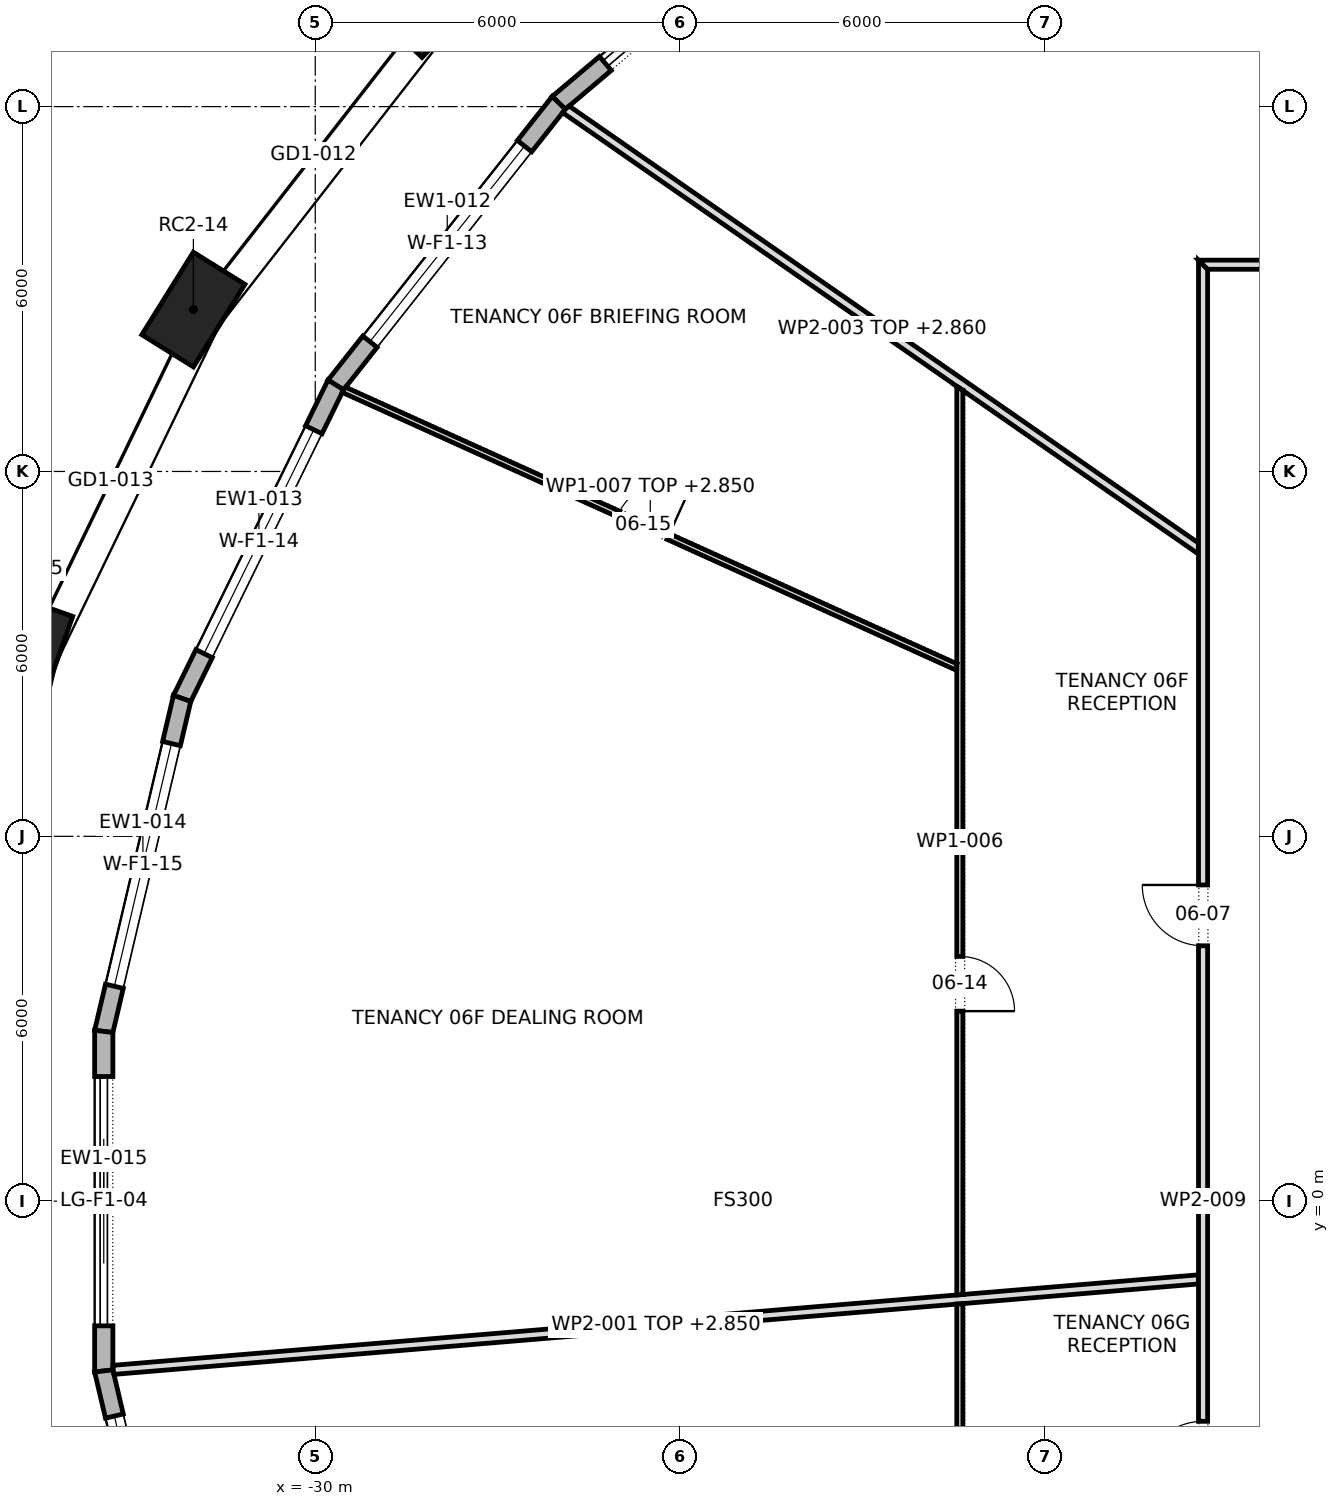
"""IFC4 building model, lengths in metres.
Left out: names, types, materials, properties, quantities, classifications, styles, units other than length and angle.
Written with IfcOpenShell. Run it as: python <this file> out.ifc"""

import sys

from ifc_helpers import new_model, si_unit, direction, frame, frame_2d, origin, origin_2d, place, context, subcontext, project, spatial, polyline, rectangle, outline, extrude, element, fill, save


model = new_model("IFC4")
c1 = context("Model", 3, precision=1e-05, world=origin(), true_north=direction((0.0, 1.0)))
c2 = subcontext(c1, "Body", "Model", "MODEL_VIEW")
j1 = project(units=[si_unit("LENGTHUNIT", "METRE"), si_unit("PLANEANGLEUNIT", "RADIAN")], contexts=[c1])
p1 = place(None, origin())
s1 = spatial("IfcSite", under=j1, at=p1, CompositionType="ELEMENT")
p2 = place(p1, origin())
s2 = spatial("IfcBuilding", under=s1, at=p2, CompositionType="ELEMENT")
p3 = place(p2, frame((0.0, 0.0, 86.5)))
s3 = spatial("IfcBuildingStorey", under=s2, at=p3, CompositionType="ELEMENT", Elevation=86.5)
for number, where, z_axis, x_axis in (
    (1, (-28.052, 19.733, 0.0), (0.0, 0.0, 1.0), (-0.692, -0.722, 0.0)),
    (2, (-32.004, 14.663, 0.0), (0.0, 0.0, 1.0), (-0.529, -0.849, 0.0)),
    (3, (-34.727, 9.029, 0.0), (0.0, 0.0, 1.0), (-0.334, -0.943, 0.0)),
):
    element("IfcColumn", number, at=place(p3, frame(where, z_axis=z_axis, x_axis=x_axis)), inside=s3, PredefinedType="COLUMN", context=c2, shape_type="SweptSolid", body=[
        extrude(rectangle(XDim=1.6, YDim=1.0, at=origin_2d()), origin(), (0.0, 0.0, 1.0), 4.2),
    ])
p4 = place(p3, frame((-21.332, 22.004, 0.0), z_axis=(0.0, 0.0, 1.0), x_axis=(-0.763753100684, -0.645508482667, 0.0)))
e4 = element("IfcWall", 4, at=p4, inside=s3, PredefinedType="STANDARD", context=c2, shape_type="SweptSolid", body=[
    extrude(outline(polyline([(-0.014, -0.15), (6.123, -0.15), (6.092, 0.15), (0.014, 0.15), (-0.014, -0.15)])), origin(), (0.0, 0.0, 1.0), 3.9),
])
p5 = place(p4, frame((1.004, 0.0, 0.0)))
e5 = element("IfcOpeningElement", 5, at=p5, cuts=e4, PredefinedType="OPENING", context=c2, shape_type="SweptSolid", body=[
    extrude(rectangle(XDim=4.1, YDim=3.45, at=frame_2d((2.05, 1.725))), frame((0.0, 0.162, 0.0), z_axis=(0.0, -1.0, 0.0), x_axis=(1.0, 0.0, 0.0)), (0.0, 0.0, 1.0), 0.324),
])
p6 = place(p3, frame((-25.996, 18.062, 0.0), z_axis=(0.0, 0.0, 1.0), x_axis=(-0.620142219764, -0.784489405452, 0.0)))
e6 = element("IfcWall", 6, at=p6, inside=s3, PredefinedType="STANDARD", context=c2, shape_type="SweptSolid", body=[
    extrude(outline(polyline([(-0.015, -0.15), (5.928, -0.15), (5.896, 0.15), (0.015, 0.15), (-0.015, -0.15)])), origin(), (0.0, 0.0, 1.0), 3.9),
])
p7 = place(p6, frame((0.906, 0.0, 0.6)))
e7 = element("IfcOpeningElement", 7, at=p7, cuts=e6, PredefinedType="OPENING", context=c2, shape_type="SweptSolid", body=[
    extrude(rectangle(XDim=4.1, YDim=2.85, at=frame_2d((2.05, 1.425))), frame((0.0, 0.162, 0.0), z_axis=(0.0, -1.0, 0.0), x_axis=(1.0, 0.0, 0.0)), (0.0, 0.0, 1.0), 0.324),
])
p8 = place(p3, frame((-29.663, 13.423, 0.0), z_axis=(0.0, 0.0, 1.0), x_axis=(-0.44010747541, -0.897945104162, 0.0)))
e8 = element("IfcWall", 8, at=p8, inside=s3, PredefinedType="STANDARD", context=c2, shape_type="SweptSolid", body=[
    extrude(outline(polyline([(-0.016, -0.15), (5.759, -0.15), (5.725, 0.15), (0.016, 0.15), (-0.016, -0.15)])), origin(), (0.0, 0.0, 1.0), 3.9),
])
p9 = place(p8, frame((0.821, 0.0, 0.6)))
e9 = element("IfcOpeningElement", 9, at=p9, cuts=e8, PredefinedType="OPENING", context=c2, shape_type="SweptSolid", body=[
    extrude(rectangle(XDim=4.1, YDim=2.85, at=frame_2d((2.05, 1.425))), frame((0.0, 0.162, 0.0), z_axis=(0.0, -1.0, 0.0), x_axis=(1.0, 0.0, 0.0)), (0.0, 0.0, 1.0), 0.324),
])
p10 = place(p3, frame((-32.19, 8.267, 0.0), z_axis=(0.0, 0.0, 1.0), x_axis=(-0.229073200999, -0.973409198941, 0.0)))
e10 = element("IfcWall", 10, at=p10, inside=s3, PredefinedType="STANDARD", context=c2, shape_type="SweptSolid", body=[
    extrude(outline(polyline([(-0.017, -0.15), (5.643, -0.15), (5.608, 0.15), (0.017, 0.15), (-0.017, -0.15)])), origin(), (0.0, 0.0, 1.0), 3.9),
])
p11 = place(p10, frame((0.763, 0.0, 0.6)))
e11 = element("IfcOpeningElement", 11, at=p11, cuts=e10, PredefinedType="OPENING", context=c2, shape_type="SweptSolid", body=[
    extrude(rectangle(XDim=4.1, YDim=2.85, at=frame_2d((2.05, 1.425))), frame((0.0, 0.162, 0.0), z_axis=(0.0, -1.0, 0.0), x_axis=(1.0, 0.0, 0.0)), (0.0, 0.0, 1.0), 0.324),
])
p12 = place(p3, frame((-33.478, 2.792, 0.0), z_axis=(0.0, 0.0, 1.0), x_axis=(0.0, -1.0, 0.0)))
e12 = element("IfcWall", 12, at=p12, inside=s3, PredefinedType="STANDARD", context=c2, shape_type="SweptSolid", body=[
    extrude(outline(polyline([(-0.017, -0.15), (5.601, -0.15), (5.566, 0.15), (0.017, 0.15), (-0.017, -0.15)])), origin(), (0.0, 0.0, 1.0), 3.9),
])
p13 = place(p12, frame((0.742, 0.0, 0.0)))
e13 = element("IfcOpeningElement", 13, at=p13, cuts=e12, PredefinedType="OPENING", context=c2, shape_type="SweptSolid", body=[
    extrude(rectangle(XDim=4.1, YDim=3.45, at=frame_2d((2.05, 1.725))), frame((0.0, 0.162, 0.0), z_axis=(0.0, -1.0, 0.0), x_axis=(1.0, 0.0, 0.0)), (0.0, 0.0, 1.0), 0.324),
])
p14 = place(p3, frame((-33.478, -2.792, 0.0), z_axis=(0.0, 0.0, 1.0), x_axis=(0.229073200999, -0.973409198941, 0.0)))
e14 = element("IfcWall", 14, at=p14, inside=s3, PredefinedType="STANDARD", context=c2, shape_type="SweptSolid", body=[
    extrude(outline(polyline([(-0.017, -0.15), (5.642, -0.15), (5.608, 0.15), (0.017, 0.15), (-0.017, -0.15)])), origin(), (0.0, 0.0, 1.0), 3.9),
])
p15 = place(p14, frame((0.763, 0.0, 0.6)))
e15 = element("IfcOpeningElement", 15, at=p15, cuts=e14, PredefinedType="OPENING", context=c2, shape_type="SweptSolid", body=[
    extrude(rectangle(XDim=4.1, YDim=2.85, at=frame_2d((2.05, 1.425))), frame((0.0, 0.162, 0.0), z_axis=(0.0, -1.0, 0.0), x_axis=(1.0, 0.0, 0.0)), (0.0, 0.0, 1.0), 0.324),
])
p16 = place(p3, frame((-33.322, -2.774, 0.0), z_axis=(0.0, 0.0, 1.0), x_axis=(0.996543032046, 0.083078187757, 0.0)))
e16 = element("IfcWall", 16, at=p16, inside=s3, PredefinedType="PARTITIONING", context=c2, shape_type="SweptSolid", body=[
    extrude(outline(polyline([(0.005, -0.075), (1.991, -0.075), (3.979, -0.075), (5.966, -0.075), (7.952, -0.075), (9.939, -0.075), (11.927, -0.075), (13.913, -0.075), (13.913, -0.074), (13.919, -0.075), (15.911, -0.075), (17.902, -0.075), (17.914, 0.07), (17.914, 0.075), (15.97, 0.075), (14.026, 0.075), (14.026, 0.074), (14.017, 0.075), (12.265, 0.075), (10.512, 0.075), (8.76, 0.075), (7.008, 0.075), (5.256, 0.075), (3.504, 0.075), (1.752, 0.075), (0.0, 0.075), (0.0, -0.044), (0.005, -0.075)])), origin(), (0.0, 0.0, 1.0), 2.85),
])
p17 = place(p3, frame((-25.888, 17.962, 0.0), z_axis=(0.0, 0.0, 1.0), x_axis=(0.821411896375, -0.570335424547, 0.0)))
e17 = element("IfcWall", 17, at=p17, inside=s3, PredefinedType="PARTITIONING", context=c2, shape_type="SweptSolid", body=[
    extrude(outline(polyline([(0.0, -0.075), (1.601, -0.075), (3.202, -0.075), (4.803, -0.075), (6.405, -0.075), (8.006, -0.075), (8.01, -0.072), (8.012, -0.075), (9.584, -0.075), (11.157, -0.075), (12.729, -0.075), (12.729, -0.074), (12.679, -0.002), (12.679, -0.002), (12.625, 0.075), (10.825, 0.075), (9.025, 0.075), (7.225, 0.075), (5.425, 0.075), (3.625, 0.075), (1.825, 0.075), (0.025, 0.075), (0.004, -0.004), (0.0, -0.067), (0.0, -0.075)])), origin(), (0.0, 0.0, 1.0), 2.86),
])
p18 = place(p3, frame((-19.4, -8.71, 0.0), z_axis=(0.0, 0.0, 1.0), x_axis=(0.0, 1.0, 0.0)))
e18 = element("IfcWall", 18, at=p18, inside=s3, PredefinedType="PARTITIONING", context=c2, shape_type="SweptSolid", body=[
    extrude(outline(polyline([(0.041, -0.05), (0.041, -0.05), (0.044, -0.049), (0.045, -0.05), (1.79, -0.05), (3.535, -0.05), (5.28, -0.05), (7.025, -0.05), (7.025, -0.044), (7.017, 0.05), (5.263, 0.05), (3.509, 0.05), (1.754, 0.05), (0.0, 0.05), (0.0, 0.049), (0.044, -0.048), (0.041, -0.05)])), origin(), (0.0, 0.0, 1.0), 3.9),
])
p19 = place(p18, frame((3.075, 0.0, 0.0)))
e19 = element("IfcOpeningElement", 19, at=p19, cuts=e18, PredefinedType="OPENING", context=c2, shape_type="SweptSolid", body=[
    extrude(rectangle(XDim=0.9, YDim=2.1, at=frame_2d((0.45, 1.05))), frame((0.0, 0.062, 0.0), z_axis=(0.0, -1.0, 0.0), x_axis=(1.0, 0.0, 0.0)), (0.0, 0.0, 1.0), 0.124),
])
p20 = place(p3, frame((-19.4, -1.542, 0.0), z_axis=(0.0, 0.0, 1.0), x_axis=(0.0, 1.0, 0.0)))
e20 = element("IfcWall", 20, at=p20, inside=s3, PredefinedType="PARTITIONING", context=c2, shape_type="SweptSolid", body=[
    extrude(outline(polyline([(0.008, -0.05), (1.866, -0.05), (3.724, -0.05), (5.582, -0.05), (7.441, -0.05), (9.299, -0.05), (11.157, -0.05), (13.015, -0.05), (14.873, -0.05), (14.927, 0.028), (14.927, 0.027), (14.942, 0.05), (14.942, 0.05), (13.421, 0.05), (11.9, 0.05), (10.379, 0.05), (10.378, 0.048), (10.374, 0.05), (8.645, 0.05), (6.916, 0.05), (5.187, 0.05), (3.458, 0.05), (1.729, 0.05), (0.0, 0.05), (0.0, 0.045), (0.008, -0.05)])), origin(), (0.0, 0.0, 1.0), 3.9),
])
p21 = place(p20, frame((4.667, 0.0, 0.0)))
e21 = element("IfcOpeningElement", 21, at=p21, cuts=e20, PredefinedType="OPENING", context=c2, shape_type="SweptSolid", body=[
    extrude(rectangle(XDim=0.9, YDim=2.1, at=frame_2d((0.45, 1.05))), frame((0.0, 0.062, 0.0), z_axis=(0.0, -1.0, 0.0), x_axis=(1.0, 0.0, 0.0)), (0.0, 0.0, 1.0), 0.124),
])
p22 = place(p3, frame((-19.43, 8.773, 0.0), z_axis=(0.0, 0.0, 1.0), x_axis=(-0.911086470292, 0.412215287987, 0.0)))
e22 = element("IfcWall", 22, at=p22, inside=s3, PredefinedType="PARTITIONING", context=c2, shape_type="SweptSolid", body=[
    extrude(outline(polyline([(0.045, -0.05), (1.884, -0.05), (3.722, -0.05), (5.561, -0.05), (7.4, -0.05), (9.239, -0.05), (11.077, -0.05), (11.091, 0.002), (11.092, 0.05), (9.243, 0.05), (7.395, 0.05), (5.546, 0.05), (3.697, 0.05), (1.849, 0.05), (0.0, 0.05), (0.0, 0.049), (0.045, -0.05)])), origin(), (0.0, 0.0, 1.0), 2.85),
])
p23 = place(p22, frame((5.23, 0.0, 0.0)))
e23 = element("IfcOpeningElement", 23, at=p23, cuts=e22, PredefinedType="OPENING", context=c2, shape_type="SweptSolid", body=[
    extrude(rectangle(XDim=0.9, YDim=2.1, at=frame_2d((0.45, 1.05))), frame((0.0, 0.062, 0.0), z_axis=(0.0, -1.0, 0.0), x_axis=(1.0, 0.0, 0.0)), (0.0, 0.0, 1.0), 0.124),
])
p24 = place(p3, frame((-15.789, 24.966, 0.0), z_axis=(0.0, 0.0, 1.0), x_axis=(0.53447919721, -0.845181630036, 0.0)))
e24 = element("IfcWall", 24, at=p24, inside=s3, PredefinedType="PARTITIONING", context=c2, shape_type="SweptSolid", body=[
    extrude(outline(polyline([(0.0, -0.075), (1.864, -0.075), (3.727, -0.075), (5.591, -0.075), (7.455, -0.075), (9.318, -0.075), (11.182, -0.075), (11.277, 0.075), (11.277, 0.075), (9.748, 0.075), (8.22, 0.075), (6.692, 0.075), (6.69, 0.072), (6.686, 0.075), (5.02, 0.075), (3.353, 0.075), (1.687, 0.075), (0.021, 0.075), (0.004, 0.001), (0.0, -0.073), (0.0, -0.075)])), origin(), (0.0, 0.0, 1.0), 3.08),
])
p25 = place(p3, frame((-15.4, -15.475, 0.0), z_axis=(0.0, 0.0, 1.0), x_axis=(0.0, 1.0, 0.0)))
e25 = element("IfcWall", 25, at=p25, inside=s3, PredefinedType="PARTITIONING", context=c2, shape_type="SweptSolid", body=[
    extrude(outline(polyline([(0.15, -0.075), (2.066, -0.075), (3.981, -0.075), (5.897, -0.075), (7.812, -0.075), (9.728, -0.075), (11.644, -0.075), (13.56, -0.075), (15.475, -0.075), (17.391, -0.075), (19.306, -0.075), (21.222, -0.075), (23.138, -0.075), (25.053, -0.075), (26.969, -0.075), (28.885, -0.075), (30.8, -0.075), (30.95, 0.075), (29.016, 0.075), (27.081, 0.075), (25.147, 0.075), (23.212, 0.075), (21.278, 0.075), (19.344, 0.075), (17.409, 0.075), (15.475, 0.075), (13.541, 0.075), (11.606, 0.075), (9.672, 0.075), (7.738, 0.075), (5.803, 0.075), (3.869, 0.075), (1.935, 0.075), (0.0, 0.075), (0.15, -0.075)])), origin(), (0.0, 0.0, 1.0), 3.9),
])
p26 = place(p25, frame((19.675, 0.0, 0.0)))
e26 = element("IfcOpeningElement", 26, at=p26, cuts=e25, PredefinedType="OPENING", context=c2, shape_type="SweptSolid", body=[
    extrude(rectangle(XDim=1.0, YDim=2.1, at=frame_2d((0.5, 1.05))), frame((0.0, 0.087, 0.0), z_axis=(0.0, -1.0, 0.0), x_axis=(1.0, 0.0, 0.0)), (0.0, 0.0, 1.0), 0.174),
])
p27 = place(p25, frame((10.855, 0.0, 0.0)))
e27 = element("IfcOpeningElement", 27, at=p27, cuts=e25, PredefinedType="OPENING", context=c2, shape_type="SweptSolid", body=[
    extrude(rectangle(XDim=1.0, YDim=2.1, at=frame_2d((0.5, 1.05))), frame((0.0, 0.087, 0.0), z_axis=(0.0, -1.0, 0.0), x_axis=(1.0, 0.0, 0.0)), (0.0, 0.0, 1.0), 0.174),
])
p28 = place(p3, frame((-15.475, 15.4, 0.0), z_axis=(0.0, 0.0, 1.0), x_axis=(1.0, 0.0, 0.0)))
e28 = element("IfcWall", 28, at=p28, inside=s3, PredefinedType="PARTITIONING", context=c2, shape_type="SweptSolid", body=[
    extrude(outline(polyline([(0.15, -0.075), (2.066, -0.075), (3.981, -0.075), (5.897, -0.075), (7.812, -0.075), (9.728, -0.075), (11.644, -0.075), (13.56, -0.075), (15.475, -0.075), (17.391, -0.075), (19.306, -0.075), (21.222, -0.075), (23.138, -0.075), (25.053, -0.075), (26.969, -0.075), (28.885, -0.075), (30.8, -0.075), (30.95, 0.075), (29.016, 0.075), (27.081, 0.075), (25.147, 0.075), (23.212, 0.075), (21.278, 0.075), (19.344, 0.075), (17.409, 0.075), (15.475, 0.075), (13.541, 0.075), (11.606, 0.075), (9.672, 0.075), (7.738, 0.075), (5.803, 0.075), (3.869, 0.075), (1.935, 0.075), (0.0, 0.075), (0.15, -0.075)])), origin(), (0.0, 0.0, 1.0), 3.9),
])
p29 = place(p28, frame((21.155, 0.0, 0.0)))
e29 = element("IfcOpeningElement", 29, at=p29, cuts=e28, PredefinedType="OPENING", context=c2, shape_type="SweptSolid", body=[
    extrude(rectangle(XDim=1.8, YDim=2.1, at=frame_2d((0.9, 1.05))), frame((0.0, 0.087, 0.0), z_axis=(0.0, -1.0, 0.0), x_axis=(1.0, 0.0, 0.0)), (0.0, 0.0, 1.0), 0.174),
])
p30 = place(p28, frame((9.21, 0.0, 0.0)))
e30 = element("IfcOpeningElement", 30, at=p30, cuts=e28, PredefinedType="OPENING", context=c2, shape_type="SweptSolid", body=[
    extrude(rectangle(XDim=1.0, YDim=2.1, at=frame_2d((0.5, 1.05))), frame((0.0, 0.087, 0.0), z_axis=(0.0, -1.0, 0.0), x_axis=(1.0, 0.0, 0.0)), (0.0, 0.0, 1.0), 0.174),
])
p31 = place(p28, frame((2.405, 0.0, 0.0)))
e31 = element("IfcOpeningElement", 31, at=p31, cuts=e28, PredefinedType="OPENING", context=c2, shape_type="SweptSolid", body=[
    extrude(rectangle(XDim=1.0, YDim=2.1, at=frame_2d((0.5, 1.05))), frame((0.0, 0.087, 0.0), z_axis=(0.0, -1.0, 0.0), x_axis=(1.0, 0.0, 0.0)), (0.0, 0.0, 1.0), 0.174),
])
p32 = place(p5, origin())
e32 = element("IfcDoor", 32, at=p32, inside=s3, OperationType="DOUBLE_DOOR_SLIDING", PredefinedType="DOOR", context=c2, shape_type="SweptSolid", body=[
    extrude(rectangle(XDim=4.1, YDim=3.45, at=frame_2d((2.05, 1.725))), frame((0.0, 0.025, 0.0), z_axis=(0.0, -1.0, 0.0), x_axis=(1.0, 0.0, 0.0)), (0.0, 0.0, 1.0), 0.05),
])
fill(e5, e32)
p33 = place(p7, origin())
e33 = element("IfcWindow", 33, at=p33, inside=s3, PartitioningType="TRIPLE_PANEL_VERTICAL", PredefinedType="WINDOW", context=c2, shape_type="SweptSolid", body=[
    extrude(rectangle(XDim=4.1, YDim=2.85, at=frame_2d((2.05, 1.425))), frame((0.0, 0.03, 0.0), z_axis=(0.0, -1.0, 0.0), x_axis=(1.0, 0.0, 0.0)), (0.0, 0.0, 1.0), 0.06),
])
fill(e7, e33)
p34 = place(p9, origin())
e34 = element("IfcWindow", 34, at=p34, inside=s3, PartitioningType="TRIPLE_PANEL_VERTICAL", PredefinedType="WINDOW", context=c2, shape_type="SweptSolid", body=[
    extrude(rectangle(XDim=4.1, YDim=2.85, at=frame_2d((2.05, 1.425))), frame((0.0, 0.03, 0.0), z_axis=(0.0, -1.0, 0.0), x_axis=(1.0, 0.0, 0.0)), (0.0, 0.0, 1.0), 0.06),
])
fill(e9, e34)
p35 = place(p11, origin())
e35 = element("IfcWindow", 35, at=p35, inside=s3, PartitioningType="TRIPLE_PANEL_VERTICAL", PredefinedType="WINDOW", context=c2, shape_type="SweptSolid", body=[
    extrude(rectangle(XDim=4.1, YDim=2.85, at=frame_2d((2.05, 1.425))), frame((0.0, 0.03, 0.0), z_axis=(0.0, -1.0, 0.0), x_axis=(1.0, 0.0, 0.0)), (0.0, 0.0, 1.0), 0.06),
])
fill(e11, e35)
p36 = place(p13, origin())
e36 = element("IfcDoor", 36, at=p36, inside=s3, OperationType="DOUBLE_DOOR_SLIDING", PredefinedType="DOOR", context=c2, shape_type="SweptSolid", body=[
    extrude(rectangle(XDim=4.1, YDim=3.45, at=frame_2d((2.05, 1.725))), frame((0.0, 0.025, 0.0), z_axis=(0.0, -1.0, 0.0), x_axis=(1.0, 0.0, 0.0)), (0.0, 0.0, 1.0), 0.05),
])
fill(e13, e36)
p37 = place(p15, origin())
e37 = element("IfcWindow", 37, at=p37, inside=s3, PartitioningType="TRIPLE_PANEL_VERTICAL", PredefinedType="WINDOW", context=c2, shape_type="SweptSolid", body=[
    extrude(rectangle(XDim=4.1, YDim=2.85, at=frame_2d((2.05, 1.425))), frame((0.0, 0.03, 0.0), z_axis=(0.0, -1.0, 0.0), x_axis=(1.0, 0.0, 0.0)), (0.0, 0.0, 1.0), 0.06),
])
fill(e15, e37)
p38 = place(p26, origin())
e38 = element("IfcDoor", 38, at=p38, inside=s3, OperationType="SINGLE_SWING_LEFT", PredefinedType="DOOR", context=c2, shape_type="SweptSolid", body=[
    extrude(rectangle(XDim=1.0, YDim=2.1, at=frame_2d((0.5, 1.05))), frame((0.0, 0.025, 0.0), z_axis=(0.0, -1.0, 0.0), x_axis=(1.0, 0.0, 0.0)), (0.0, 0.0, 1.0), 0.05),
])
fill(e26, e38)
p39 = place(p27, origin())
e39 = element("IfcDoor", 39, at=p39, inside=s3, OperationType="SINGLE_SWING_RIGHT", PredefinedType="DOOR", context=c2, shape_type="SweptSolid", body=[
    extrude(rectangle(XDim=1.0, YDim=2.1, at=frame_2d((0.5, 1.05))), frame((0.0, 0.025, 0.0), z_axis=(0.0, -1.0, 0.0), x_axis=(1.0, 0.0, 0.0)), (0.0, 0.0, 1.0), 0.05),
])
fill(e27, e39)
p40 = place(p21, frame((0.9, 0.0, 0.0), z_axis=(0.0, 0.0, 1.0), x_axis=(-1.0, 0.0, 0.0)))
e40 = element("IfcDoor", 40, at=p40, inside=s3, OperationType="SINGLE_SWING_LEFT", PredefinedType="DOOR", context=c2, shape_type="SweptSolid", body=[
    extrude(rectangle(XDim=0.9, YDim=2.1, at=frame_2d((0.45, 1.05))), frame((0.0, 0.025, 0.0), z_axis=(0.0, -1.0, 0.0), x_axis=(1.0, 0.0, 0.0)), (0.0, 0.0, 1.0), 0.05),
])
fill(e21, e40)
p41 = place(p23, frame((0.9, 0.0, 0.0), z_axis=(0.0, 0.0, 1.0), x_axis=(-1.0, 0.0, 0.0)))
e41 = element("IfcDoor", 41, at=p41, inside=s3, OperationType="SINGLE_SWING_LEFT", PredefinedType="DOOR", context=c2, shape_type="SweptSolid", body=[
    extrude(rectangle(XDim=0.9, YDim=2.1, at=frame_2d((0.45, 1.05))), frame((0.0, 0.025, 0.0), z_axis=(0.0, -1.0, 0.0), x_axis=(1.0, 0.0, 0.0)), (0.0, 0.0, 1.0), 0.05),
])
fill(e23, e41)
save(model, sys.argv[1])
